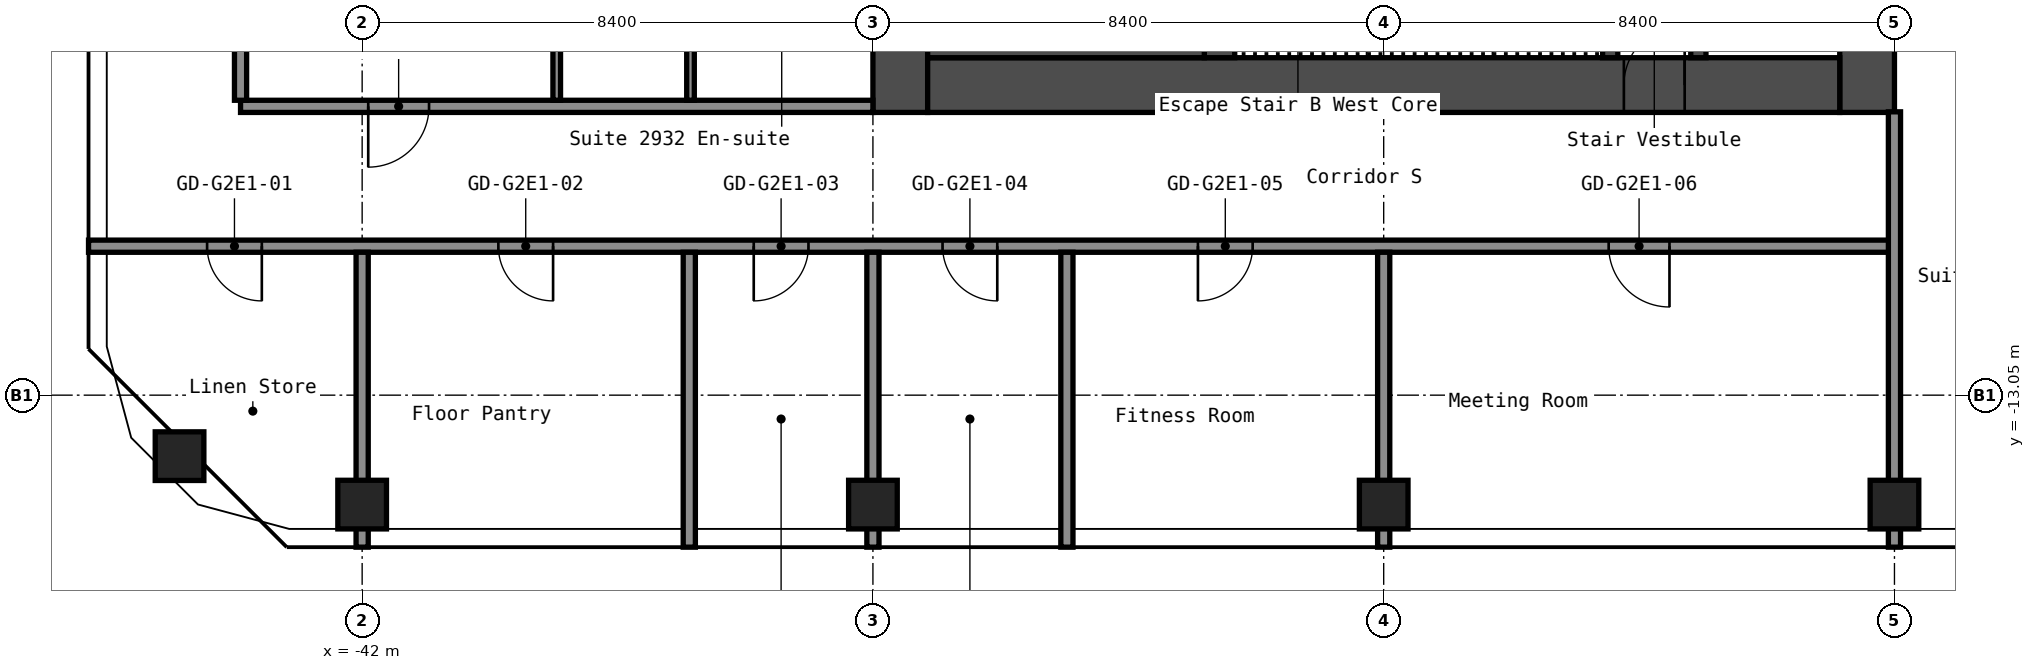
"""IFC4 building model, lengths in metres.
Left out: names, types, materials, properties, quantities, classifications, styles, units other than length and angle.
Written with IfcOpenShell. Run it as: python <this file> out.ifc"""

import sys

from ifc_helpers import new_model, si_unit, direction, frame, frame_2d, origin, origin_2d, place, context, subcontext, project, spatial, rectangle, hollow_rectangle, extrude, element, fill, save


model = new_model("IFC4")
c1 = context("Model", 3, precision=1e-05, world=origin(), true_north=direction((0.0, 1.0)))
c2 = subcontext(c1, "Body", "Model", "MODEL_VIEW")
j1 = project(units=[si_unit("LENGTHUNIT", "METRE"), si_unit("PLANEANGLEUNIT", "RADIAN")], contexts=[c1])
p1 = place(None, origin())
s1 = spatial("IfcSite", under=j1, at=p1, CompositionType="ELEMENT")
p2 = place(p1, origin())
s2 = spatial("IfcBuilding", under=s1, at=p2, CompositionType="ELEMENT")
p3 = place(p2, frame((0.0, 0.0, 104.2)))
s3 = spatial("IfcBuildingStorey", under=s2, at=p3, CompositionType="ELEMENT", Elevation=104.2)
for number, where, z_axis, x_axis in (
    (1, (-45.003, -14.053, 0.0), (0.0, 0.0, 1.0), (1.0, 0.0, 0.0)),
    (2, (-42.0, -14.85, 0.0), (0.0, 0.0, 1.0), (1.0, 0.0, 0.0)),
    (3, (-33.6, -14.85, 0.0), (0.0, 0.0, 1.0), (1.0, 0.0, 0.0)),
    (4, (-25.2, -14.85, 0.0), (0.0, 0.0, 1.0), (1.0, 0.0, 0.0)),
    (5, (-16.8, -14.85, 0.0), (0.0, 0.0, 1.0), (1.0, 0.0, 0.0)),
):
    element("IfcColumn", number, at=place(p3, frame(where, z_axis=z_axis, x_axis=x_axis)), inside=s3, PredefinedType="COLUMN", context=c2, shape_type="SweptSolid", body=[
        extrude(hollow_rectangle(XDim=0.8, YDim=0.8, WallThickness=0.032, at=origin_2d()), origin(), (0.0, 0.0, 1.0), 2.8),
    ])
p4 = place(p3, frame((-17.25, -8.4, 0.0), z_axis=(0.0, 0.0, 1.0), x_axis=(0.0, 1.0, 0.0)))
e6 = element("IfcWall", 6, at=p4, inside=s3, PredefinedType="SHEAR", context=c2, shape_type="SweptSolid", body=[
    extrude(rectangle(XDim=16.8, YDim=0.9, at=frame_2d((8.4, 0.0))), origin(), (0.0, 0.0, 1.0), 2.8),
])
p5 = place(p4, frame((7.6, 0.0, 0.0)))
e7 = element("IfcOpeningElement", 7, at=p5, cuts=e6, PredefinedType="OPENING", context=c2, shape_type="SweptSolid", body=[
    extrude(rectangle(XDim=1.2, YDim=2.1, at=frame_2d((0.6, 1.05))), frame((0.0, 0.46, 0.0), z_axis=(0.0, -1.0, 0.0), x_axis=(1.0, 0.0, 0.0)), (0.0, 0.0, 1.0), 0.92),
])
p6 = place(p3, frame((-33.15, -8.4, 0.0), z_axis=(0.0, 0.0, 1.0), x_axis=(0.0, 1.0, 0.0)))
e8 = element("IfcWall", 8, at=p6, inside=s3, PredefinedType="SHEAR", context=c2, shape_type="SweptSolid", body=[
    extrude(rectangle(XDim=16.8, YDim=0.9, at=frame_2d((8.4, 0.0))), origin(), (0.0, 0.0, 1.0), 2.8),
])
p7 = place(p3, frame((-32.7, -7.95, 0.0), z_axis=(0.0, 0.0, 1.0), x_axis=(1.0, 0.0, 0.0)))
e9 = element("IfcWall", 9, at=p7, inside=s3, PredefinedType="SHEAR", context=c2, shape_type="SweptSolid", body=[
    extrude(rectangle(XDim=15.0, YDim=0.9, at=frame_2d((7.5, 0.0))), origin(), (0.0, 0.0, 1.0), 2.8),
])
p8 = place(p7, frame((11.45, 0.0, 0.0)))
e10 = element("IfcOpeningElement", 10, at=p8, cuts=e9, PredefinedType="OPENING", context=c2, shape_type="SweptSolid", body=[
    extrude(rectangle(XDim=1.0, YDim=2.1, at=frame_2d((0.5, 1.05))), frame((0.0, 0.46, 0.0), z_axis=(0.0, -1.0, 0.0), x_axis=(1.0, 0.0, 0.0)), (0.0, 0.0, 1.0), 0.92),
])
p9 = place(p3, frame((-20.025, -7.5, 0.0), z_axis=(0.0, 0.0, 1.0), x_axis=(0.0, 1.0, 0.0)))
e11 = element("IfcWall", 11, at=p9, inside=s3, PredefinedType="SHEAR", context=c2, shape_type="SweptSolid", body=[
    extrude(rectangle(XDim=6.3, YDim=0.25, at=frame_2d((3.15, 0.0))), origin(), (0.0, 0.0, 1.0), 2.8),
])
p10 = place(p9, frame((2.4, 0.0, 0.0)))
e12 = element("IfcOpeningElement", 12, at=p10, cuts=e11, PredefinedType="OPENING", context=c2, shape_type="SweptSolid", body=[
    extrude(rectangle(XDim=1.0, YDim=2.1, at=frame_2d((0.5, 1.05))), frame((0.0, 0.135, 0.0), z_axis=(0.0, -1.0, 0.0), x_axis=(1.0, 0.0, 0.0)), (0.0, 0.0, 1.0), 0.27),
])
p11 = place(p3, frame((-21.475, -7.5, 0.0), z_axis=(0.0, 0.0, 1.0), x_axis=(0.0, 1.0, 0.0)))
e13 = element("IfcWall", 13, at=p11, inside=s3, PredefinedType="SHEAR", context=c2, shape_type="SweptSolid", body=[
    extrude(rectangle(XDim=3.75, YDim=0.25, at=frame_2d((1.875, 0.0))), origin(), (0.0, 0.0, 1.0), 2.8),
])
p12 = place(p11, frame((1.3, 0.0, 0.0)))
e14 = element("IfcOpeningElement", 14, at=p12, cuts=e13, PredefinedType="OPENING", context=c2, shape_type="SweptSolid", body=[
    extrude(rectangle(XDim=1.2, YDim=2.1, at=frame_2d((0.6, 1.05))), frame((0.0, 0.135, 0.0), z_axis=(0.0, -1.0, 0.0), x_axis=(1.0, 0.0, 0.0)), (0.0, 0.0, 1.0), 0.27),
])
p13 = place(p3, frame((-27.9, -7.5, 0.0), z_axis=(0.0, 0.0, 1.0), x_axis=(0.0, 1.0, 0.0)))
e15 = element("IfcWall", 15, at=p13, inside=s3, PredefinedType="SHEAR", context=c2, shape_type="SweptSolid", body=[
    extrude(rectangle(XDim=3.75, YDim=0.5, at=frame_2d((1.875, 0.0))), origin(), (0.0, 0.0, 1.0), 2.8),
])
p14 = place(p3, frame((-32.7, -6.75, 0.0), z_axis=(0.0, 0.0, 1.0), x_axis=(1.0, 0.0, 0.0)))
e16 = element("IfcWall", 16, at=p14, inside=s3, PredefinedType="SHEAR", context=c2, shape_type="SweptSolid", body=[
    extrude(rectangle(XDim=4.55, YDim=1.5, at=frame_2d((2.275, 0.0))), origin(), (0.0, 0.0, 1.0), 2.8),
])
p15 = place(p3, frame((-46.5, -10.6, 0.0), z_axis=(0.0, 0.0, 1.0), x_axis=(1.0, 0.0, 0.0)))
e17 = element("IfcWall", 17, at=p15, inside=s3, PredefinedType="PARTITIONING", context=c2, shape_type="SweptSolid", body=[
    extrude(rectangle(XDim=29.7, YDim=0.2, at=frame_2d((14.85, 0.0))), origin(), (0.0, 0.0, 1.0), 2.8),
])
p16 = place(p15, frame((1.95, 0.0, 0.0)))
e18 = element("IfcOpeningElement", 18, at=p16, cuts=e17, PredefinedType="OPENING", context=c2, shape_type="SweptSolid", body=[
    extrude(rectangle(XDim=0.9, YDim=2.1, at=frame_2d((0.45, 1.05))), frame((0.0, 0.11, 0.0), z_axis=(0.0, -1.0, 0.0), x_axis=(1.0, 0.0, 0.0)), (0.0, 0.0, 1.0), 0.22),
])
p17 = place(p15, frame((6.74, 0.0, 0.0)))
e19 = element("IfcOpeningElement", 19, at=p17, cuts=e17, PredefinedType="OPENING", context=c2, shape_type="SweptSolid", body=[
    extrude(rectangle(XDim=0.9, YDim=2.1, at=frame_2d((0.45, 1.05))), frame((0.0, 0.11, 0.0), z_axis=(0.0, -1.0, 0.0), x_axis=(1.0, 0.0, 0.0)), (0.0, 0.0, 1.0), 0.22),
])
p18 = place(p15, frame((10.94, 0.0, 0.0)))
e20 = element("IfcOpeningElement", 20, at=p18, cuts=e17, PredefinedType="OPENING", context=c2, shape_type="SweptSolid", body=[
    extrude(rectangle(XDim=0.9, YDim=2.1, at=frame_2d((0.45, 1.05))), frame((0.0, 0.11, 0.0), z_axis=(0.0, -1.0, 0.0), x_axis=(1.0, 0.0, 0.0)), (0.0, 0.0, 1.0), 0.22),
])
p19 = place(p15, frame((14.045, 0.0, 0.0)))
e21 = element("IfcOpeningElement", 21, at=p19, cuts=e17, PredefinedType="OPENING", context=c2, shape_type="SweptSolid", body=[
    extrude(rectangle(XDim=0.9, YDim=2.1, at=frame_2d((0.45, 1.05))), frame((0.0, 0.11, 0.0), z_axis=(0.0, -1.0, 0.0), x_axis=(1.0, 0.0, 0.0)), (0.0, 0.0, 1.0), 0.22),
])
p20 = place(p15, frame((18.245, 0.0, 0.0)))
e22 = element("IfcOpeningElement", 22, at=p20, cuts=e17, PredefinedType="OPENING", context=c2, shape_type="SweptSolid", body=[
    extrude(rectangle(XDim=0.9, YDim=2.1, at=frame_2d((0.45, 1.05))), frame((0.0, 0.11, 0.0), z_axis=(0.0, -1.0, 0.0), x_axis=(1.0, 0.0, 0.0)), (0.0, 0.0, 1.0), 0.22),
])
p21 = place(p15, frame((25.0, 0.0, 0.0)))
e23 = element("IfcOpeningElement", 23, at=p21, cuts=e17, PredefinedType="OPENING", context=c2, shape_type="SweptSolid", body=[
    extrude(rectangle(XDim=1.0, YDim=2.1, at=frame_2d((0.5, 1.05))), frame((0.0, 0.11, 0.0), z_axis=(0.0, -1.0, 0.0), x_axis=(1.0, 0.0, 0.0)), (0.0, 0.0, 1.0), 0.22),
])
p22 = place(p3, frame((-44.0, -8.3, 0.0), z_axis=(0.0, 0.0, 1.0), x_axis=(1.0, 0.0, 0.0)))
e24 = element("IfcWall", 24, at=p22, inside=s3, PredefinedType="PARTITIONING", context=c2, shape_type="SweptSolid", body=[
    extrude(rectangle(XDim=10.4, YDim=0.2, at=frame_2d((5.2, 0.0))), origin(), (0.0, 0.0, 1.0), 2.8),
])
p23 = place(p22, frame((2.1, 0.0, 0.0)))
e25 = element("IfcOpeningElement", 25, at=p23, cuts=e24, PredefinedType="OPENING", context=c2, shape_type="SweptSolid", body=[
    extrude(rectangle(XDim=1.0, YDim=2.1, at=frame_2d((0.5, 1.05))), frame((0.0, 0.11, 0.0), z_axis=(0.0, -1.0, 0.0), x_axis=(1.0, 0.0, 0.0)), (0.0, 0.0, 1.0), 0.22),
])
p24 = place(p3, frame((-44.0, -8.2, 0.0), z_axis=(0.0, 0.0, 1.0), x_axis=(0.0, 1.0, 0.0)))
e26 = element("IfcWall", 26, at=p24, inside=s3, PredefinedType="PARTITIONING", context=c2, shape_type="SweptSolid", body=[
    extrude(rectangle(XDim=16.4, YDim=0.2, at=frame_2d((8.2, 0.0))), origin(), (0.0, 0.0, 1.0), 2.8),
])
p25 = place(p3, frame((-42.0, -15.55, 0.0), z_axis=(0.0, 0.0, 1.0), x_axis=(0.0, 1.0, 0.0)))
e27 = element("IfcWall", 27, at=p25, inside=s3, PredefinedType="PARTITIONING", context=c2, shape_type="SweptSolid", body=[
    extrude(rectangle(XDim=4.85, YDim=0.2, at=frame_2d((2.425, 0.0))), origin(), (0.0, 0.0, 1.0), 2.8),
])
p26 = place(p3, frame((-38.8, -8.2, 0.0), z_axis=(0.0, 0.0, 1.0), x_axis=(0.0, 1.0, 0.0)))
e28 = element("IfcWall", 28, at=p26, inside=s3, PredefinedType="PARTITIONING", context=c2, shape_type="SweptSolid", body=[
    extrude(rectangle(XDim=8.1, YDim=0.125, at=frame_2d((4.05, 0.0))), origin(), (0.0, 0.0, 1.0), 2.8),
])
p27 = place(p26, frame((4.05, 0.0, 0.0)))
e29 = element("IfcOpeningElement", 29, at=p27, cuts=e28, PredefinedType="OPENING", context=c2, shape_type="SweptSolid", body=[
    extrude(rectangle(XDim=0.9, YDim=2.1, at=frame_2d((0.45, 1.05))), frame((0.0, 0.073, 0.0), z_axis=(0.0, -1.0, 0.0), x_axis=(1.0, 0.0, 0.0)), (0.0, 0.0, 1.0), 0.145),
])
p28 = place(p3, frame((-36.62, -15.55, 0.0), z_axis=(0.0, 0.0, 1.0), x_axis=(0.0, 1.0, 0.0)))
e30 = element("IfcWall", 30, at=p28, inside=s3, PredefinedType="PARTITIONING", context=c2, shape_type="SweptSolid", body=[
    extrude(rectangle(XDim=4.85, YDim=0.2, at=frame_2d((2.425, 0.0))), origin(), (0.0, 0.0, 1.0), 2.8),
])
p29 = place(p3, frame((-36.6, -8.2, 0.0), z_axis=(0.0, 0.0, 1.0), x_axis=(0.0, 1.0, 0.0)))
e31 = element("IfcWall", 31, at=p29, inside=s3, PredefinedType="PARTITIONING", context=c2, shape_type="SweptSolid", body=[
    extrude(rectangle(XDim=3.1, YDim=0.125, at=frame_2d((1.55, 0.0))), origin(), (0.0, 0.0, 1.0), 2.8),
])
for number, where, z_axis, x_axis in (
    (32, (-33.6, -15.55, 0.0), (0.0, 0.0, 1.0), (0.0, 1.0, 0.0)),
    (33, (-30.41, -15.55, 0.0), (0.0, 0.0, 1.0), (0.0, 1.0, 0.0)),
    (34, (-25.2, -15.55, 0.0), (0.0, 0.0, 1.0), (0.0, 1.0, 0.0)),
):
    element("IfcWall", number, at=place(p3, frame(where, z_axis=z_axis, x_axis=x_axis)), inside=s3, PredefinedType="PARTITIONING", context=c2, shape_type="SweptSolid", body=[
        extrude(rectangle(XDim=4.85, YDim=0.2, at=frame_2d((2.425, 0.0))), origin(), (0.0, 0.0, 1.0), 2.8),
    ])
p30 = place(p3, frame((-16.8, -15.55, 0.0), z_axis=(0.0, 0.0, 1.0), x_axis=(0.0, 1.0, 0.0)))
e35 = element("IfcWall", 35, at=p30, inside=s3, PredefinedType="PARTITIONING", context=c2, shape_type="SweptSolid", body=[
    extrude(rectangle(XDim=7.16, YDim=0.2, at=frame_2d((3.58, 0.0))), origin(), (0.0, 0.0, 1.0), 2.8),
])
p31 = place(p8, origin())
e36 = element("IfcDoor", 36, at=p31, inside=s3, OperationType="SINGLE_SWING_LEFT", PredefinedType="DOOR", context=c2, shape_type="SweptSolid", body=[
    extrude(rectangle(XDim=1.0, YDim=2.1, at=frame_2d((0.5, 1.05))), frame((0.0, 0.025, 0.0), z_axis=(0.0, -1.0, 0.0), x_axis=(1.0, 0.0, 0.0)), (0.0, 0.0, 1.0), 0.05),
])
fill(e10, e36)
p32 = place(p16, origin())
e37 = element("IfcDoor", 37, at=p32, inside=s3, OperationType="SINGLE_SWING_RIGHT", PredefinedType="DOOR", context=c2, shape_type="SweptSolid", body=[
    extrude(rectangle(XDim=0.9, YDim=2.1, at=frame_2d((0.45, 1.05))), frame((0.0, 0.025, 0.0), z_axis=(0.0, -1.0, 0.0), x_axis=(1.0, 0.0, 0.0)), (0.0, 0.0, 1.0), 0.05),
])
fill(e18, e37)
p33 = place(p17, origin())
e38 = element("IfcDoor", 38, at=p33, inside=s3, OperationType="SINGLE_SWING_RIGHT", PredefinedType="DOOR", context=c2, shape_type="SweptSolid", body=[
    extrude(rectangle(XDim=0.9, YDim=2.1, at=frame_2d((0.45, 1.05))), frame((0.0, 0.025, 0.0), z_axis=(0.0, -1.0, 0.0), x_axis=(1.0, 0.0, 0.0)), (0.0, 0.0, 1.0), 0.05),
])
fill(e19, e38)
p34 = place(p18, origin())
e39 = element("IfcDoor", 39, at=p34, inside=s3, OperationType="SINGLE_SWING_LEFT", PredefinedType="DOOR", context=c2, shape_type="SweptSolid", body=[
    extrude(rectangle(XDim=0.9, YDim=2.1, at=frame_2d((0.45, 1.05))), frame((0.0, 0.025, 0.0), z_axis=(0.0, -1.0, 0.0), x_axis=(1.0, 0.0, 0.0)), (0.0, 0.0, 1.0), 0.05),
])
fill(e20, e39)
p35 = place(p19, origin())
e40 = element("IfcDoor", 40, at=p35, inside=s3, OperationType="SINGLE_SWING_RIGHT", PredefinedType="DOOR", context=c2, shape_type="SweptSolid", body=[
    extrude(rectangle(XDim=0.9, YDim=2.1, at=frame_2d((0.45, 1.05))), frame((0.0, 0.025, 0.0), z_axis=(0.0, -1.0, 0.0), x_axis=(1.0, 0.0, 0.0)), (0.0, 0.0, 1.0), 0.05),
])
fill(e21, e40)
p36 = place(p20, origin())
e41 = element("IfcDoor", 41, at=p36, inside=s3, OperationType="SINGLE_SWING_LEFT", PredefinedType="DOOR", context=c2, shape_type="SweptSolid", body=[
    extrude(rectangle(XDim=0.9, YDim=2.1, at=frame_2d((0.45, 1.05))), frame((0.0, 0.025, 0.0), z_axis=(0.0, -1.0, 0.0), x_axis=(1.0, 0.0, 0.0)), (0.0, 0.0, 1.0), 0.05),
])
fill(e22, e41)
p37 = place(p21, origin())
e42 = element("IfcDoor", 42, at=p37, inside=s3, OperationType="SINGLE_SWING_RIGHT", PredefinedType="DOOR", context=c2, shape_type="SweptSolid", body=[
    extrude(rectangle(XDim=1.0, YDim=2.1, at=frame_2d((0.5, 1.05))), frame((0.0, 0.025, 0.0), z_axis=(0.0, -1.0, 0.0), x_axis=(1.0, 0.0, 0.0)), (0.0, 0.0, 1.0), 0.05),
])
fill(e23, e42)
p38 = place(p23, origin())
e43 = element("IfcDoor", 43, at=p38, inside=s3, OperationType="SINGLE_SWING_LEFT", PredefinedType="DOOR", context=c2, shape_type="SweptSolid", body=[
    extrude(rectangle(XDim=1.0, YDim=2.1, at=frame_2d((0.5, 1.05))), frame((0.0, 0.025, 0.0), z_axis=(0.0, -1.0, 0.0), x_axis=(1.0, 0.0, 0.0)), (0.0, 0.0, 1.0), 0.05),
])
fill(e25, e43)
save(model, sys.argv[1])
